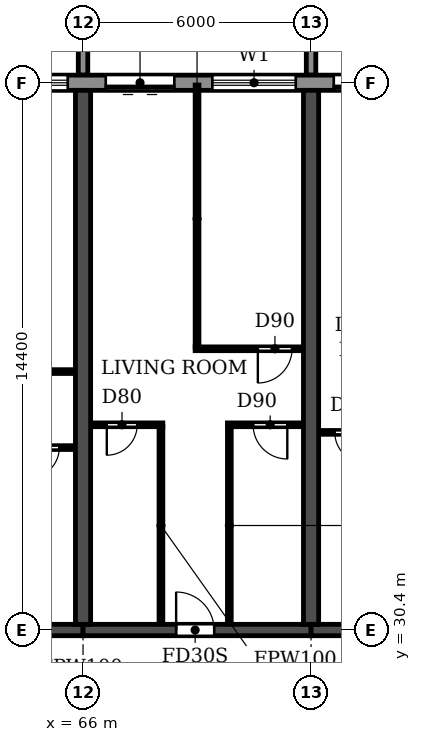
"""IFC4 building model, lengths in metres.
Left out: names, types, materials, properties, quantities, classifications, styles, units other than length and angle.
Written with IfcOpenShell. Run it as: python <this file> out.ifc"""

import sys

from ifc_helpers import new_model, si_unit, direction, frame, frame_2d, origin, place, context, subcontext, project, spatial, polyline, rectangle, outline, extrude, source, transform, mapped, element, fill, save


model = new_model("IFC4")
c1 = context("Model", 3, precision=1e-05, world=origin(), true_north=direction((0.0, 1.0)))
c2 = subcontext(c1, "Body", "Model", "MODEL_VIEW")
j1 = project(units=[si_unit("LENGTHUNIT", "METRE"), si_unit("PLANEANGLEUNIT", "RADIAN")], contexts=[c1])
p1 = place(None, origin())
s1 = spatial("IfcSite", under=j1, at=p1, CompositionType="ELEMENT")
p2 = place(p1, origin())
s2 = spatial("IfcBuilding", under=s1, at=p2, CompositionType="ELEMENT")
p3 = place(p2, frame((0.0, 0.0, 56.4)))
s3 = spatial("IfcBuildingStorey", under=s2, at=p3, CompositionType="ELEMENT", Elevation=56.4)
for number, where, z_axis, x_axis in (
    (1, (66.0, 30.55, 0.0), (0.0, 0.0, 1.0), (0.0, 1.0, 0.0)),
    (2, (72.0, 30.55, 0.0), (0.0, 0.0, 1.0), (0.0, 1.0, 0.0)),
):
    element("IfcWall", number, at=place(p3, frame(where, z_axis=z_axis, x_axis=x_axis)), inside=s3, PredefinedType="SHEAR", context=c2, shape_type="SweptSolid", body=[
        extrude(rectangle(XDim=14.05, YDim=0.4, at=frame_2d((7.025, 0.0))), origin(), (0.0, 0.0, 1.0), 3.05),
    ])
p4 = place(p3, frame((60.0, 30.4, 0.0), z_axis=(0.0, 0.0, 1.0), x_axis=(1.0, 0.0, 0.0)))
e3 = element("IfcWall", 3, at=p4, inside=s3, PredefinedType="SHEAR", context=c2, shape_type="SweptSolid", body=[
    extrude(rectangle(XDim=6.0, YDim=0.3, at=frame_2d((3.0, 0.0))), origin(), (0.0, 0.0, 1.0), 2.45),
])
p5 = place(p4, frame((2.55, 0.0, 0.0)))
e4 = element("IfcOpeningElement", 4, at=p5, cuts=e3, PredefinedType="OPENING", context=c2, shape_type="SweptSolid", body=[
    extrude(rectangle(XDim=1.0, YDim=2.1, at=frame_2d((0.5, 1.05))), frame((0.0, 0.16, 0.0), z_axis=(0.0, -1.0, 0.0), x_axis=(1.0, 0.0, 0.0)), (0.0, 0.0, 1.0), 0.32),
])
p6 = place(p3, frame((66.0, 30.4, 0.0), z_axis=(0.0, 0.0, 1.0), x_axis=(1.0, 0.0, 0.0)))
e5 = element("IfcWall", 5, at=p6, inside=s3, PredefinedType="SHEAR", context=c2, shape_type="SweptSolid", body=[
    extrude(rectangle(XDim=6.0, YDim=0.3, at=frame_2d((3.0, 0.0))), origin(), (0.0, 0.0, 1.0), 2.45),
])
p7 = place(p6, frame((2.45, 0.0, 0.0)))
e6 = element("IfcOpeningElement", 6, at=p7, cuts=e5, PredefinedType="OPENING", context=c2, shape_type="SweptSolid", body=[
    extrude(rectangle(XDim=1.0, YDim=2.1, at=frame_2d((0.5, 1.05))), frame((0.0, 0.16, 0.0), z_axis=(0.0, -1.0, 0.0), x_axis=(1.0, 0.0, 0.0)), (0.0, 0.0, 1.0), 0.32),
])
p8 = place(p3, frame((72.0, 30.4, 0.0), z_axis=(0.0, 0.0, 1.0), x_axis=(1.0, 0.0, 0.0)))
e7 = element("IfcWall", 7, at=p8, inside=s3, PredefinedType="SHEAR", context=c2, shape_type="SweptSolid", body=[
    extrude(rectangle(XDim=6.0, YDim=0.3, at=frame_2d((3.0, 0.0))), origin(), (0.0, 0.0, 1.0), 2.45),
])
p9 = place(p8, frame((2.45, 0.0, 0.0)))
e8 = element("IfcOpeningElement", 8, at=p9, cuts=e7, PredefinedType="OPENING", context=c2, shape_type="SweptSolid", body=[
    extrude(rectangle(XDim=1.0, YDim=2.1, at=frame_2d((0.5, 1.05))), frame((0.0, 0.16, 0.0), z_axis=(0.0, -1.0, 0.0), x_axis=(1.0, 0.0, 0.0)), (0.0, 0.0, 1.0), 0.32),
])
p10 = place(p3, frame((91.317, 44.8, 0.0), z_axis=(0.0, 0.0, 1.0), x_axis=(-1.0, 0.0, 0.0)))
e9 = element("IfcWall", 9, at=p10, inside=s3, PredefinedType="STANDARD", context=c2, shape_type="SweptSolid", body=[
    extrude(rectangle(XDim=80.634, YDim=0.4, at=frame_2d((40.317, 0.0))), origin(), (0.0, 0.0, 1.0), 3.05),
])
p11 = place(p10, frame((76.717, 0.0, 0.9)))
e10 = element("IfcOpeningElement", 10, at=p11, cuts=e9, PredefinedType="OPENING", context=c2, shape_type="SweptSolid", body=[
    extrude(rectangle(XDim=2.2, YDim=1.5, at=frame_2d((1.1, 0.75))), frame((0.0, 0.21, 0.0), z_axis=(0.0, -1.0, 0.0), x_axis=(1.0, 0.0, 0.0)), (0.0, 0.0, 1.0), 0.42),
])
p12 = place(p10, frame((73.917, 0.0, 0.0)))
e11 = element("IfcOpeningElement", 11, at=p12, cuts=e9, PredefinedType="OPENING", context=c2, shape_type="SweptSolid", body=[
    extrude(rectangle(XDim=1.8, YDim=2.4, at=frame_2d((0.9, 1.2))), frame((0.0, 0.21, 0.0), z_axis=(0.0, -1.0, 0.0), x_axis=(1.0, 0.0, 0.0)), (0.0, 0.0, 1.0), 0.42),
])
p13 = place(p10, frame((70.717, 0.0, 0.9)))
e12 = element("IfcOpeningElement", 12, at=p13, cuts=e9, PredefinedType="OPENING", context=c2, shape_type="SweptSolid", body=[
    extrude(rectangle(XDim=2.2, YDim=1.5, at=frame_2d((1.1, 0.75))), frame((0.0, 0.21, 0.0), z_axis=(0.0, -1.0, 0.0), x_axis=(1.0, 0.0, 0.0)), (0.0, 0.0, 1.0), 0.42),
])
p14 = place(p10, frame((67.917, 0.0, 0.0)))
e13 = element("IfcOpeningElement", 13, at=p14, cuts=e9, PredefinedType="OPENING", context=c2, shape_type="SweptSolid", body=[
    extrude(rectangle(XDim=1.8, YDim=2.4, at=frame_2d((0.9, 1.2))), frame((0.0, 0.21, 0.0), z_axis=(0.0, -1.0, 0.0), x_axis=(1.0, 0.0, 0.0)), (0.0, 0.0, 1.0), 0.42),
])
p15 = place(p10, frame((64.717, 0.0, 0.9)))
e14 = element("IfcOpeningElement", 14, at=p15, cuts=e9, PredefinedType="OPENING", context=c2, shape_type="SweptSolid", body=[
    extrude(rectangle(XDim=2.2, YDim=1.5, at=frame_2d((1.1, 0.75))), frame((0.0, 0.21, 0.0), z_axis=(0.0, -1.0, 0.0), x_axis=(1.0, 0.0, 0.0)), (0.0, 0.0, 1.0), 0.42),
])
p16 = place(p10, frame((61.917, 0.0, 0.0)))
e15 = element("IfcOpeningElement", 15, at=p16, cuts=e9, PredefinedType="OPENING", context=c2, shape_type="SweptSolid", body=[
    extrude(rectangle(XDim=1.8, YDim=2.4, at=frame_2d((0.9, 1.2))), frame((0.0, 0.21, 0.0), z_axis=(0.0, -1.0, 0.0), x_axis=(1.0, 0.0, 0.0)), (0.0, 0.0, 1.0), 0.42),
])
p17 = place(p10, frame((58.717, 0.0, 0.9)))
e16 = element("IfcOpeningElement", 16, at=p17, cuts=e9, PredefinedType="OPENING", context=c2, shape_type="SweptSolid", body=[
    extrude(rectangle(XDim=2.2, YDim=1.5, at=frame_2d((1.1, 0.75))), frame((0.0, 0.21, 0.0), z_axis=(0.0, -1.0, 0.0), x_axis=(1.0, 0.0, 0.0)), (0.0, 0.0, 1.0), 0.42),
])
p18 = place(p10, frame((55.717, 0.0, 0.9)))
e17 = element("IfcOpeningElement", 17, at=p18, cuts=e9, PredefinedType="OPENING", context=c2, shape_type="SweptSolid", body=[
    extrude(rectangle(XDim=2.2, YDim=1.5, at=frame_2d((1.1, 0.75))), frame((0.0, 0.21, 0.0), z_axis=(0.0, -1.0, 0.0), x_axis=(1.0, 0.0, 0.0)), (0.0, 0.0, 1.0), 0.42),
])
p19 = place(p10, frame((52.917, 0.0, 0.0)))
e18 = element("IfcOpeningElement", 18, at=p19, cuts=e9, PredefinedType="OPENING", context=c2, shape_type="SweptSolid", body=[
    extrude(rectangle(XDim=1.8, YDim=2.4, at=frame_2d((0.9, 1.2))), frame((0.0, 0.21, 0.0), z_axis=(0.0, -1.0, 0.0), x_axis=(1.0, 0.0, 0.0)), (0.0, 0.0, 1.0), 0.42),
])
p20 = place(p10, frame((49.717, 0.0, 0.9)))
e19 = element("IfcOpeningElement", 19, at=p20, cuts=e9, PredefinedType="OPENING", context=c2, shape_type="SweptSolid", body=[
    extrude(rectangle(XDim=2.2, YDim=1.5, at=frame_2d((1.1, 0.75))), frame((0.0, 0.21, 0.0), z_axis=(0.0, -1.0, 0.0), x_axis=(1.0, 0.0, 0.0)), (0.0, 0.0, 1.0), 0.42),
])
p21 = place(p10, frame((46.917, 0.0, 0.0)))
e20 = element("IfcOpeningElement", 20, at=p21, cuts=e9, PredefinedType="OPENING", context=c2, shape_type="SweptSolid", body=[
    extrude(rectangle(XDim=1.8, YDim=2.4, at=frame_2d((0.9, 1.2))), frame((0.0, 0.21, 0.0), z_axis=(0.0, -1.0, 0.0), x_axis=(1.0, 0.0, 0.0)), (0.0, 0.0, 1.0), 0.42),
])
p22 = place(p10, frame((43.717, 0.0, 0.9)))
e21 = element("IfcOpeningElement", 21, at=p22, cuts=e9, PredefinedType="OPENING", context=c2, shape_type="SweptSolid", body=[
    extrude(rectangle(XDim=2.2, YDim=1.5, at=frame_2d((1.1, 0.75))), frame((0.0, 0.21, 0.0), z_axis=(0.0, -1.0, 0.0), x_axis=(1.0, 0.0, 0.0)), (0.0, 0.0, 1.0), 0.42),
])
p23 = place(p10, frame((40.717, 0.0, 0.9)))
e22 = element("IfcOpeningElement", 22, at=p23, cuts=e9, PredefinedType="OPENING", context=c2, shape_type="SweptSolid", body=[
    extrude(rectangle(XDim=2.2, YDim=1.5, at=frame_2d((1.1, 0.75))), frame((0.0, 0.21, 0.0), z_axis=(0.0, -1.0, 0.0), x_axis=(1.0, 0.0, 0.0)), (0.0, 0.0, 1.0), 0.42),
])
p24 = place(p10, frame((37.717, 0.0, 0.9)))
e23 = element("IfcOpeningElement", 23, at=p24, cuts=e9, PredefinedType="OPENING", context=c2, shape_type="SweptSolid", body=[
    extrude(rectangle(XDim=2.2, YDim=1.5, at=frame_2d((1.1, 0.75))), frame((0.0, 0.21, 0.0), z_axis=(0.0, -1.0, 0.0), x_axis=(1.0, 0.0, 0.0)), (0.0, 0.0, 1.0), 0.42),
])
p25 = place(p10, frame((34.717, 0.0, 0.9)))
e24 = element("IfcOpeningElement", 24, at=p25, cuts=e9, PredefinedType="OPENING", context=c2, shape_type="SweptSolid", body=[
    extrude(rectangle(XDim=2.2, YDim=1.5, at=frame_2d((1.1, 0.75))), frame((0.0, 0.21, 0.0), z_axis=(0.0, -1.0, 0.0), x_axis=(1.0, 0.0, 0.0)), (0.0, 0.0, 1.0), 0.42),
])
p26 = place(p10, frame((31.917, 0.0, 0.0)))
e25 = element("IfcOpeningElement", 25, at=p26, cuts=e9, PredefinedType="OPENING", context=c2, shape_type="SweptSolid", body=[
    extrude(rectangle(XDim=1.8, YDim=2.4, at=frame_2d((0.9, 1.2))), frame((0.0, 0.21, 0.0), z_axis=(0.0, -1.0, 0.0), x_axis=(1.0, 0.0, 0.0)), (0.0, 0.0, 1.0), 0.42),
])
p27 = place(p10, frame((28.917, 0.0, 0.0)))
e26 = element("IfcOpeningElement", 26, at=p27, cuts=e9, PredefinedType="OPENING", context=c2, shape_type="SweptSolid", body=[
    extrude(rectangle(XDim=1.8, YDim=2.4, at=frame_2d((0.9, 1.2))), frame((0.0, 0.21, 0.0), z_axis=(0.0, -1.0, 0.0), x_axis=(1.0, 0.0, 0.0)), (0.0, 0.0, 1.0), 0.42),
])
p28 = place(p10, frame((25.717, 0.0, 0.9)))
e27 = element("IfcOpeningElement", 27, at=p28, cuts=e9, PredefinedType="OPENING", context=c2, shape_type="SweptSolid", body=[
    extrude(rectangle(XDim=2.2, YDim=1.5, at=frame_2d((1.1, 0.75))), frame((0.0, 0.21, 0.0), z_axis=(0.0, -1.0, 0.0), x_axis=(1.0, 0.0, 0.0)), (0.0, 0.0, 1.0), 0.42),
])
p29 = place(p10, frame((22.917, 0.0, 0.0)))
e28 = element("IfcOpeningElement", 28, at=p29, cuts=e9, PredefinedType="OPENING", context=c2, shape_type="SweptSolid", body=[
    extrude(rectangle(XDim=1.8, YDim=2.4, at=frame_2d((0.9, 1.2))), frame((0.0, 0.21, 0.0), z_axis=(0.0, -1.0, 0.0), x_axis=(1.0, 0.0, 0.0)), (0.0, 0.0, 1.0), 0.42),
])
p30 = place(p10, frame((19.717, 0.0, 0.9)))
e29 = element("IfcOpeningElement", 29, at=p30, cuts=e9, PredefinedType="OPENING", context=c2, shape_type="SweptSolid", body=[
    extrude(rectangle(XDim=2.2, YDim=1.5, at=frame_2d((1.1, 0.75))), frame((0.0, 0.21, 0.0), z_axis=(0.0, -1.0, 0.0), x_axis=(1.0, 0.0, 0.0)), (0.0, 0.0, 1.0), 0.42),
])
p31 = place(p10, frame((16.917, 0.0, 0.0)))
e30 = element("IfcOpeningElement", 30, at=p31, cuts=e9, PredefinedType="OPENING", context=c2, shape_type="SweptSolid", body=[
    extrude(rectangle(XDim=1.8, YDim=2.4, at=frame_2d((0.9, 1.2))), frame((0.0, 0.21, 0.0), z_axis=(0.0, -1.0, 0.0), x_axis=(1.0, 0.0, 0.0)), (0.0, 0.0, 1.0), 0.42),
])
p32 = place(p10, frame((13.717, 0.0, 0.9)))
e31 = element("IfcOpeningElement", 31, at=p32, cuts=e9, PredefinedType="OPENING", context=c2, shape_type="SweptSolid", body=[
    extrude(rectangle(XDim=2.2, YDim=1.5, at=frame_2d((1.1, 0.75))), frame((0.0, 0.21, 0.0), z_axis=(0.0, -1.0, 0.0), x_axis=(1.0, 0.0, 0.0)), (0.0, 0.0, 1.0), 0.42),
])
p33 = place(p10, frame((10.917, 0.0, 0.0)))
e32 = element("IfcOpeningElement", 32, at=p33, cuts=e9, PredefinedType="OPENING", context=c2, shape_type="SweptSolid", body=[
    extrude(rectangle(XDim=1.8, YDim=2.4, at=frame_2d((0.9, 1.2))), frame((0.0, 0.21, 0.0), z_axis=(0.0, -1.0, 0.0), x_axis=(1.0, 0.0, 0.0)), (0.0, 0.0, 1.0), 0.42),
])
p34 = place(p10, frame((7.717, 0.0, 0.9)))
e33 = element("IfcOpeningElement", 33, at=p34, cuts=e9, PredefinedType="OPENING", context=c2, shape_type="SweptSolid", body=[
    extrude(rectangle(XDim=2.2, YDim=1.5, at=frame_2d((1.1, 0.75))), frame((0.0, 0.21, 0.0), z_axis=(0.0, -1.0, 0.0), x_axis=(1.0, 0.0, 0.0)), (0.0, 0.0, 1.0), 0.42),
])
p35 = place(p10, frame((4.717, 0.0, 0.9)))
e34 = element("IfcOpeningElement", 34, at=p35, cuts=e9, PredefinedType="OPENING", context=c2, shape_type="SweptSolid", body=[
    extrude(rectangle(XDim=2.2, YDim=1.5, at=frame_2d((1.1, 0.75))), frame((0.0, 0.21, 0.0), z_axis=(0.0, -1.0, 0.0), x_axis=(1.0, 0.0, 0.0)), (0.0, 0.0, 1.0), 0.42),
])
p36 = place(p10, frame((1.717, 0.0, 0.9)))
e35 = element("IfcOpeningElement", 35, at=p36, cuts=e9, PredefinedType="OPENING", context=c2, shape_type="SweptSolid", body=[
    extrude(rectangle(XDim=2.2, YDim=1.5, at=frame_2d((1.1, 0.75))), frame((0.0, 0.21, 0.0), z_axis=(0.0, -1.0, 0.0), x_axis=(1.0, 0.0, 0.0)), (0.0, 0.0, 1.0), 0.42),
])
m1 = source(origin(), c2, "Body", "SweptSolid", [
    extrude(outline(polyline([(0.0, 0.0), (0.25, 0.0), (0.25, 3.1), (0.0, 3.1), (0.0, 0.0)])), origin(), (0.0, 0.0, 1.0), 3.1),
])
for number, where in (
    (36, (65.875, 45.0, 0.0)),
    (37, (71.875, 45.0, 0.0)),
):
    element("IfcWall", number, at=place(p3, frame(where)), inside=s3, PredefinedType="STANDARD", context=c2, shape_type="MappedRepresentation", body=[
        mapped(m1, transform((0.0, 0.0, 0.0))),
    ])
p37 = place(p3, frame((63.9, 35.2, 0.0), z_axis=(0.0, 0.0, 1.0), x_axis=(1.0, 0.0, 0.0)))
e38 = element("IfcWall", 38, at=p37, inside=s3, PredefinedType="PARTITIONING", context=c2, shape_type="SweptSolid", body=[
    extrude(rectangle(XDim=1.89, YDim=0.1, at=frame_2d((0.945, 0.0))), origin(), (0.0, 0.0, 1.0), 3.05),
])
p38 = place(p37, frame((0.675, 0.0, 0.0)))
e39 = element("IfcOpeningElement", 39, at=p38, cuts=e38, PredefinedType="OPENING", context=c2, shape_type="SweptSolid", body=[
    extrude(rectangle(XDim=0.8, YDim=2.1, at=frame_2d((0.4, 1.05))), frame((0.0, 0.06, 0.0), z_axis=(0.0, -1.0, 0.0), x_axis=(1.0, 0.0, 0.0)), (0.0, 0.0, 1.0), 0.12),
])
p39 = place(p3, frame((72.21, 35.6, 0.0), z_axis=(0.0, 0.0, 1.0), x_axis=(1.0, 0.0, 0.0)))
e40 = element("IfcWall", 40, at=p39, inside=s3, PredefinedType="PARTITIONING", context=c2, shape_type="SweptSolid", body=[
    extrude(rectangle(XDim=1.89, YDim=0.1, at=frame_2d((0.945, 0.0))), origin(), (0.0, 0.0, 1.0), 3.05),
])
p40 = place(p39, frame((0.415, 0.0, 0.0)))
e41 = element("IfcOpeningElement", 41, at=p40, cuts=e40, PredefinedType="OPENING", context=c2, shape_type="SweptSolid", body=[
    extrude(rectangle(XDim=0.8, YDim=2.1, at=frame_2d((0.4, 1.05))), frame((0.0, 0.06, 0.0), z_axis=(0.0, -1.0, 0.0), x_axis=(1.0, 0.0, 0.0)), (0.0, 0.0, 1.0), 0.12),
])
p41 = place(p3, frame((66.21, 35.8, 0.0), z_axis=(0.0, 0.0, 1.0), x_axis=(1.0, 0.0, 0.0)))
e42 = element("IfcWall", 42, at=p41, inside=s3, PredefinedType="PARTITIONING", context=c2, shape_type="SweptSolid", body=[
    extrude(rectangle(XDim=1.89, YDim=0.1, at=frame_2d((0.945, 0.0))), origin(), (0.0, 0.0, 1.0), 3.05),
])
p42 = place(p41, frame((0.415, 0.0, 0.0)))
e43 = element("IfcOpeningElement", 43, at=p42, cuts=e42, PredefinedType="OPENING", context=c2, shape_type="SweptSolid", body=[
    extrude(rectangle(XDim=0.8, YDim=2.1, at=frame_2d((0.4, 1.05))), frame((0.0, 0.06, 0.0), z_axis=(0.0, -1.0, 0.0), x_axis=(1.0, 0.0, 0.0)), (0.0, 0.0, 1.0), 0.12),
])
p43 = place(p3, frame((69.8, 35.8, 0.0), z_axis=(0.0, 0.0, 1.0), x_axis=(1.0, 0.0, 0.0)))
e44 = element("IfcWall", 44, at=p43, inside=s3, PredefinedType="PARTITIONING", context=c2, shape_type="SweptSolid", body=[
    extrude(rectangle(XDim=1.99, YDim=0.1, at=frame_2d((0.995, 0.0))), origin(), (0.0, 0.0, 1.0), 3.05),
])
p44 = place(p43, frame((0.675, 0.0, 0.0)))
e45 = element("IfcOpeningElement", 45, at=p44, cuts=e44, PredefinedType="OPENING", context=c2, shape_type="SweptSolid", body=[
    extrude(rectangle(XDim=0.9, YDim=2.1, at=frame_2d((0.45, 1.05))), frame((0.0, 0.06, 0.0), z_axis=(0.0, -1.0, 0.0), x_axis=(1.0, 0.0, 0.0)), (0.0, 0.0, 1.0), 0.12),
])
p45 = place(p3, frame((62.95, 37.2, 0.0), z_axis=(0.0, 0.0, 1.0), x_axis=(1.0, 0.0, 0.0)))
e46 = element("IfcWall", 46, at=p45, inside=s3, PredefinedType="PARTITIONING", context=c2, shape_type="SweptSolid", body=[
    extrude(rectangle(XDim=2.84, YDim=0.1, at=frame_2d((1.42, 0.0))), origin(), (0.0, 0.0, 1.0), 3.05),
])
p46 = place(p45, frame((0.55, 0.0, 0.0)))
e47 = element("IfcOpeningElement", 47, at=p46, cuts=e46, PredefinedType="OPENING", context=c2, shape_type="SweptSolid", body=[
    extrude(rectangle(XDim=0.9, YDim=2.1, at=frame_2d((0.45, 1.05))), frame((0.0, 0.06, 0.0), z_axis=(0.0, -1.0, 0.0), x_axis=(1.0, 0.0, 0.0)), (0.0, 0.0, 1.0), 0.12),
])
p47 = place(p3, frame((68.95, 37.8, 0.0), z_axis=(0.0, 0.0, 1.0), x_axis=(1.0, 0.0, 0.0)))
e48 = element("IfcWall", 48, at=p47, inside=s3, PredefinedType="PARTITIONING", context=c2, shape_type="SweptSolid", body=[
    extrude(rectangle(XDim=2.84, YDim=0.1, at=frame_2d((1.42, 0.0))), origin(), (0.0, 0.0, 1.0), 3.05),
])
p48 = place(p47, frame((1.65, 0.0, 0.0)))
e49 = element("IfcOpeningElement", 49, at=p48, cuts=e48, PredefinedType="OPENING", context=c2, shape_type="SweptSolid", body=[
    extrude(rectangle(XDim=0.9, YDim=2.1, at=frame_2d((0.45, 1.05))), frame((0.0, 0.06, 0.0), z_axis=(0.0, -1.0, 0.0), x_axis=(1.0, 0.0, 0.0)), (0.0, 0.0, 1.0), 0.12),
])
p49 = place(p3, frame((68.05, 30.56, 0.0), z_axis=(0.0, 0.0, 1.0), x_axis=(0.0, 1.0, 0.0)))
e50 = element("IfcWall", 50, at=p49, inside=s3, PredefinedType="PARTITIONING", context=c2, shape_type="SweptSolid", body=[
    extrude(rectangle(XDim=5.19, YDim=0.1, at=frame_2d((2.595, 0.0))), origin(), (0.0, 0.0, 1.0), 3.05),
])
p50 = place(p3, frame((69.0, 37.85, 0.0), z_axis=(0.0, 0.0, 1.0), x_axis=(0.0, 1.0, 0.0)))
e51 = element("IfcWall", 51, at=p50, inside=s3, PredefinedType="PARTITIONING", context=c2, shape_type="SweptSolid", body=[
    extrude(rectangle(XDim=6.89, YDim=0.1, at=frame_2d((3.445, 0.0))), origin(), (0.0, 0.0, 1.0), 3.05),
])
p51 = place(p3, frame((69.85, 30.56, 0.0), z_axis=(0.0, 0.0, 1.0), x_axis=(0.0, 1.0, 0.0)))
e52 = element("IfcWall", 52, at=p51, inside=s3, PredefinedType="PARTITIONING", context=c2, shape_type="SweptSolid", body=[
    extrude(rectangle(XDim=5.19, YDim=0.1, at=frame_2d((2.595, 0.0))), origin(), (0.0, 0.0, 1.0), 3.05),
])
p52 = place(p28, origin())
e53 = element("IfcWindow", 53, at=p52, inside=s3, PartitioningType="DOUBLE_PANEL_HORIZONTAL", PredefinedType="WINDOW", context=c2, shape_type="SweptSolid", body=[
    extrude(rectangle(XDim=2.2, YDim=1.5, at=frame_2d((1.1, 0.75))), frame((0.0, 0.03, 0.0), z_axis=(0.0, -1.0, 0.0), x_axis=(1.0, 0.0, 0.0)), (0.0, 0.0, 1.0), 0.06),
])
fill(e27, e53)
p53 = place(p29, origin())
e54 = element("IfcDoor", 54, at=p53, inside=s3, OperationType="DOUBLE_DOOR_SLIDING", PredefinedType="DOOR", context=c2, shape_type="SweptSolid", body=[
    extrude(rectangle(XDim=1.8, YDim=2.4, at=frame_2d((0.9, 1.2))), frame((0.0, 0.025, 0.0), z_axis=(0.0, -1.0, 0.0), x_axis=(1.0, 0.0, 0.0)), (0.0, 0.0, 1.0), 0.05),
])
fill(e28, e54)
p54 = place(p30, origin())
e55 = element("IfcWindow", 55, at=p54, inside=s3, PartitioningType="DOUBLE_PANEL_HORIZONTAL", PredefinedType="WINDOW", context=c2, shape_type="SweptSolid", body=[
    extrude(rectangle(XDim=2.2, YDim=1.5, at=frame_2d((1.1, 0.75))), frame((0.0, 0.03, 0.0), z_axis=(0.0, -1.0, 0.0), x_axis=(1.0, 0.0, 0.0)), (0.0, 0.0, 1.0), 0.06),
])
fill(e29, e55)
p55 = place(p31, origin())
e56 = element("IfcDoor", 56, at=p55, inside=s3, OperationType="DOUBLE_DOOR_SLIDING", PredefinedType="DOOR", context=c2, shape_type="SweptSolid", body=[
    extrude(rectangle(XDim=1.8, YDim=2.4, at=frame_2d((0.9, 1.2))), frame((0.0, 0.025, 0.0), z_axis=(0.0, -1.0, 0.0), x_axis=(1.0, 0.0, 0.0)), (0.0, 0.0, 1.0), 0.05),
])
fill(e30, e56)
p56 = place(p38, frame((0.8, 0.0, 0.0), z_axis=(0.0, 0.0, 1.0), x_axis=(-1.0, 0.0, 0.0)))
e57 = element("IfcDoor", 57, at=p56, inside=s3, OperationType="SINGLE_SWING_RIGHT", PredefinedType="DOOR", context=c2, shape_type="SweptSolid", body=[
    extrude(rectangle(XDim=0.8, YDim=2.1, at=frame_2d((0.4, 1.05))), frame((0.0, 0.025, 0.0), z_axis=(0.0, -1.0, 0.0), x_axis=(1.0, 0.0, 0.0)), (0.0, 0.0, 1.0), 0.05),
])
fill(e39, e57)
p57 = place(p42, frame((0.8, 0.0, 0.0), z_axis=(0.0, 0.0, 1.0), x_axis=(-1.0, 0.0, 0.0)))
e58 = element("IfcDoor", 58, at=p57, inside=s3, OperationType="SINGLE_SWING_RIGHT", PredefinedType="DOOR", context=c2, shape_type="SweptSolid", body=[
    extrude(rectangle(XDim=0.8, YDim=2.1, at=frame_2d((0.4, 1.05))), frame((0.0, 0.025, 0.0), z_axis=(0.0, -1.0, 0.0), x_axis=(1.0, 0.0, 0.0)), (0.0, 0.0, 1.0), 0.05),
])
fill(e43, e58)
p58 = place(p7, origin())
e59 = element("IfcDoor", 59, at=p58, inside=s3, OperationType="SINGLE_SWING_LEFT", PredefinedType="DOOR", context=c2, shape_type="SweptSolid", body=[
    extrude(rectangle(XDim=1.0, YDim=2.1, at=frame_2d((0.5, 1.05))), frame((0.0, 0.025, 0.0), z_axis=(0.0, -1.0, 0.0), x_axis=(1.0, 0.0, 0.0)), (0.0, 0.0, 1.0), 0.05),
])
fill(e6, e59)
p59 = place(p44, frame((0.9, 0.0, 0.0), z_axis=(0.0, 0.0, 1.0), x_axis=(-1.0, 0.0, 0.0)))
e60 = element("IfcDoor", 60, at=p59, inside=s3, OperationType="SINGLE_SWING_LEFT", PredefinedType="DOOR", context=c2, shape_type="SweptSolid", body=[
    extrude(rectangle(XDim=0.9, YDim=2.1, at=frame_2d((0.45, 1.05))), frame((0.0, 0.025, 0.0), z_axis=(0.0, -1.0, 0.0), x_axis=(1.0, 0.0, 0.0)), (0.0, 0.0, 1.0), 0.05),
])
fill(e45, e60)
p60 = place(p48, frame((0.9, 0.0, 0.0), z_axis=(0.0, 0.0, 1.0), x_axis=(-1.0, 0.0, 0.0)))
e61 = element("IfcDoor", 61, at=p60, inside=s3, OperationType="SINGLE_SWING_RIGHT", PredefinedType="DOOR", context=c2, shape_type="SweptSolid", body=[
    extrude(rectangle(XDim=0.9, YDim=2.1, at=frame_2d((0.45, 1.05))), frame((0.0, 0.025, 0.0), z_axis=(0.0, -1.0, 0.0), x_axis=(1.0, 0.0, 0.0)), (0.0, 0.0, 1.0), 0.05),
])
fill(e49, e61)
p61 = place(p40, frame((0.8, 0.0, 0.0), z_axis=(0.0, 0.0, 1.0), x_axis=(-1.0, 0.0, 0.0)))
e62 = element("IfcDoor", 62, at=p61, inside=s3, OperationType="SINGLE_SWING_LEFT", PredefinedType="DOOR", context=c2, shape_type="SweptSolid", body=[
    extrude(rectangle(XDim=0.8, YDim=2.1, at=frame_2d((0.4, 1.05))), frame((0.0, 0.025, 0.0), z_axis=(0.0, -1.0, 0.0), x_axis=(1.0, 0.0, 0.0)), (0.0, 0.0, 1.0), 0.05),
])
fill(e41, e62)
save(model, sys.argv[1])
